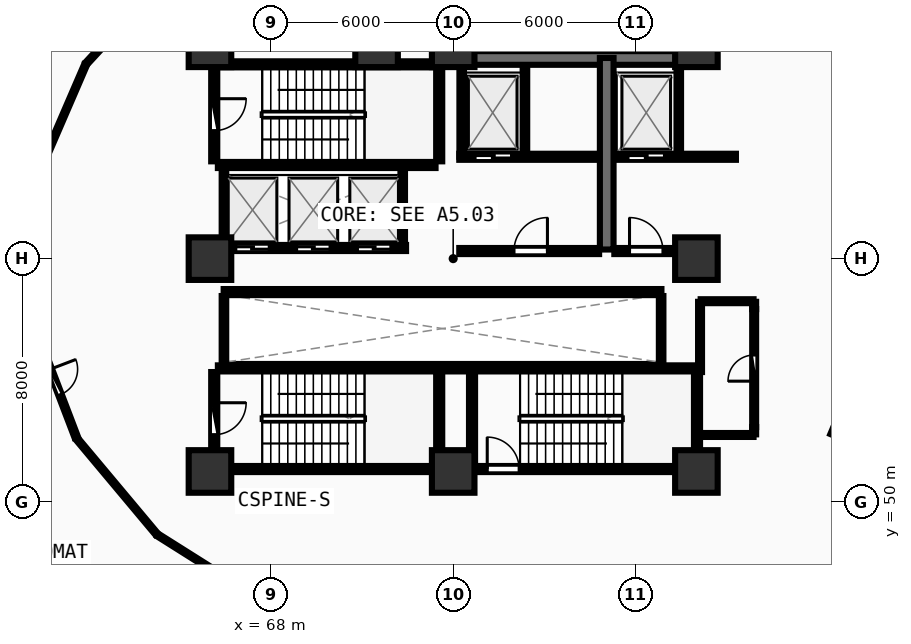
"""IFC4 building model, lengths in metres.
Left out: names, types, materials, properties, quantities, classifications, styles, units other than length and angle.
Written with IfcOpenShell. Run it as: python <this file> out.ifc"""

import sys

from ifc_helpers import new_model, si_unit, direction, frame, frame_2d, origin, origin_2d, place, context, subcontext, project, spatial, rectangle, extrude, element, fill, save


model = new_model("IFC4")
c1 = context("Model", 3, precision=1e-05, world=origin(), true_north=direction((0.0, 1.0)))
c2 = subcontext(c1, "Body", "Model", "MODEL_VIEW")
j1 = project(units=[si_unit("LENGTHUNIT", "METRE"), si_unit("PLANEANGLEUNIT", "RADIAN")], contexts=[c1])
p1 = place(None, origin())
s1 = spatial("IfcSite", under=j1, at=p1, CompositionType="ELEMENT")
p2 = place(p1, origin())
s2 = spatial("IfcBuilding", under=s1, at=p2, CompositionType="ELEMENT")
p3 = place(p2, frame((0.0, 0.0, 13.5)))
s3 = spatial("IfcBuildingStorey", under=s2, at=p3, CompositionType="ELEMENT", Elevation=13.5)
for number, where, z_axis, x_axis in (
    (1, (66.0, 51.0, 0.0), (0.0, 0.0, 1.0), (1.0, 0.0, 0.0)),
    (2, (74.0, 51.0, 0.0), (0.0, 0.0, 1.0), (1.0, 0.0, 0.0)),
    (3, (82.0, 51.0, 0.0), (0.0, 0.0, 1.0), (1.0, 0.0, 0.0)),
    (4, (82.0, 58.0, 0.0), (0.0, 0.0, 1.0), (1.0, 0.0, 0.0)),
    (5, (82.0, 65.0, 0.0), (0.0, 0.0, 1.0), (1.0, 0.0, 0.0)),
    (6, (74.0, 65.0, 0.0), (0.0, 0.0, 1.0), (1.0, 0.0, 0.0)),
    (7, (71.48, 65.0, 0.0), (0.0, 0.0, 1.0), (1.0, 0.0, 0.0)),
    (8, (66.0, 65.0, 0.0), (0.0, 0.0, 1.0), (1.0, 0.0, 0.0)),
    (9, (66.0, 58.0, 0.0), (0.0, 0.0, 1.0), (1.0, 0.0, 0.0)),
):
    element("IfcColumn", number, at=place(p3, frame(where, z_axis=z_axis, x_axis=x_axis)), inside=s3, PredefinedType="PILASTER", context=c2, shape_type="SweptSolid", body=[
        extrude(rectangle(XDim=1.4, YDim=1.4, at=origin_2d()), origin(), (0.0, 0.0, 1.0), 4.5),
    ])
p4 = place(p3, frame((66.26, 61.08, 0.0), z_axis=(0.0, 0.0, 1.0), x_axis=(1.0, 0.0, 0.0)))
e10 = element("IfcWall", 10, at=p4, inside=s3, PredefinedType="SHEAR", context=c2, shape_type="SweptSolid", body=[
    extrude(rectangle(XDim=7.16, YDim=0.2, at=frame_2d((3.58, 0.0))), origin(), (0.0, 0.0, 1.0), 4.1),
])
p5 = place(p3, frame((73.54, 61.2, 0.0), z_axis=(0.0, 0.0, 1.0), x_axis=(0.0, 1.0, 0.0)))
e11 = element("IfcWall", 11, at=p5, inside=s3, PredefinedType="SHEAR", context=c2, shape_type="SweptSolid", body=[
    extrude(rectangle(XDim=3.07, YDim=0.2, at=frame_2d((1.535, 0.0))), origin(), (0.0, 0.0, 1.0), 4.1),
])
p6 = place(p3, frame((73.42, 64.39, 0.0), z_axis=(0.0, 0.0, 1.0), x_axis=(-1.0, 0.0, 0.0)))
e12 = element("IfcWall", 12, at=p6, inside=s3, PredefinedType="SHEAR", context=c2, shape_type="SweptSolid", body=[
    extrude(rectangle(XDim=7.16, YDim=0.2, at=frame_2d((3.58, 0.0))), origin(), (0.0, 0.0, 1.0), 4.1),
])
p7 = place(p3, frame((66.14, 64.27, 0.0), z_axis=(0.0, 0.0, 1.0), x_axis=(0.0, -1.0, 0.0)))
e13 = element("IfcWall", 13, at=p7, inside=s3, PredefinedType="SHEAR", context=c2, shape_type="SweptSolid", body=[
    extrude(rectangle(XDim=3.07, YDim=0.2, at=frame_2d((1.535, 0.0))), origin(), (0.0, 0.0, 1.0), 4.1),
])
p8 = place(p7, frame((1.01, 0.0, 0.0)))
e14 = element("IfcOpeningElement", 14, at=p8, cuts=e13, PredefinedType="OPENING", context=c2, shape_type="SweptSolid", body=[
    extrude(rectangle(XDim=1.05, YDim=2.1, at=frame_2d((0.525, 1.05))), frame((0.0, 0.11, 0.0), z_axis=(0.0, -1.0, 0.0), x_axis=(1.0, 0.0, 0.0)), (0.0, 0.0, 1.0), 0.22),
])
p9 = place(p3, frame((74.0, 51.08, 0.0), z_axis=(0.0, 0.0, 1.0), x_axis=(1.0, 0.0, 0.0)))
e15 = element("IfcWall", 15, at=p9, inside=s3, PredefinedType="SHEAR", context=c2, shape_type="SweptSolid", body=[
    extrude(rectangle(XDim=7.9, YDim=0.2, at=frame_2d((3.95, 0.0))), origin(), (0.0, 0.0, 1.0), 4.1),
])
p10 = place(p9, frame((1.12, 0.0, 0.0)))
e16 = element("IfcOpeningElement", 16, at=p10, cuts=e15, PredefinedType="OPENING", context=c2, shape_type="SweptSolid", body=[
    extrude(rectangle(XDim=1.05, YDim=2.1, at=frame_2d((0.525, 1.05))), frame((0.0, 0.11, 0.0), z_axis=(0.0, -1.0, 0.0), x_axis=(1.0, 0.0, 0.0)), (0.0, 0.0, 1.0), 0.22),
])
p11 = place(p3, frame((82.02, 51.2, 0.0), z_axis=(0.0, 0.0, 1.0), x_axis=(0.0, 1.0, 0.0)))
e17 = element("IfcWall", 17, at=p11, inside=s3, PredefinedType="SHEAR", context=c2, shape_type="SweptSolid", body=[
    extrude(rectangle(XDim=3.07, YDim=0.2, at=frame_2d((1.535, 0.0))), origin(), (0.0, 0.0, 1.0), 4.1),
])
p12 = place(p3, frame((81.9, 54.39, 0.0), z_axis=(0.0, 0.0, 1.0), x_axis=(-1.0, 0.0, 0.0)))
e18 = element("IfcWall", 18, at=p12, inside=s3, PredefinedType="SHEAR", context=c2, shape_type="SweptSolid", body=[
    extrude(rectangle(XDim=8.46, YDim=0.2, at=frame_2d((4.23, 0.0))), origin(), (0.0, 0.0, 1.0), 4.1),
])
p13 = place(p3, frame((74.62, 54.27, 0.0), z_axis=(0.0, 0.0, 1.0), x_axis=(0.0, -1.0, 0.0)))
e19 = element("IfcWall", 19, at=p13, inside=s3, PredefinedType="SHEAR", context=c2, shape_type="SweptSolid", body=[
    extrude(rectangle(XDim=3.07, YDim=0.2, at=frame_2d((1.535, 0.0))), origin(), (0.0, 0.0, 1.0), 4.1),
])
p14 = place(p3, frame((66.26, 51.08, 0.0), z_axis=(0.0, 0.0, 1.0), x_axis=(1.0, 0.0, 0.0)))
e20 = element("IfcWall", 20, at=p14, inside=s3, PredefinedType="SHEAR", context=c2, shape_type="SweptSolid", body=[
    extrude(rectangle(XDim=7.16, YDim=0.2, at=frame_2d((3.58, 0.0))), origin(), (0.0, 0.0, 1.0), 4.1),
])
p15 = place(p3, frame((73.54, 51.2, 0.0), z_axis=(0.0, 0.0, 1.0), x_axis=(0.0, 1.0, 0.0)))
e21 = element("IfcWall", 21, at=p15, inside=s3, PredefinedType="SHEAR", context=c2, shape_type="SweptSolid", body=[
    extrude(rectangle(XDim=3.07, YDim=0.2, at=frame_2d((1.535, 0.0))), origin(), (0.0, 0.0, 1.0), 4.1),
])
p16 = place(p3, frame((73.42, 54.39, 0.0), z_axis=(0.0, 0.0, 1.0), x_axis=(-1.0, 0.0, 0.0)))
e22 = element("IfcWall", 22, at=p16, inside=s3, PredefinedType="SHEAR", context=c2, shape_type="SweptSolid", body=[
    extrude(rectangle(XDim=7.16, YDim=0.2, at=frame_2d((3.58, 0.0))), origin(), (0.0, 0.0, 1.0), 4.1),
])
p17 = place(p3, frame((66.14, 54.27, 0.0), z_axis=(0.0, 0.0, 1.0), x_axis=(0.0, -1.0, 0.0)))
e23 = element("IfcWall", 23, at=p17, inside=s3, PredefinedType="SHEAR", context=c2, shape_type="SweptSolid", body=[
    extrude(rectangle(XDim=3.07, YDim=0.2, at=frame_2d((1.535, 0.0))), origin(), (0.0, 0.0, 1.0), 4.1),
])
p18 = place(p17, frame((1.01, 0.0, 0.0)))
e24 = element("IfcOpeningElement", 24, at=p18, cuts=e23, PredefinedType="OPENING", context=c2, shape_type="SweptSolid", body=[
    extrude(rectangle(XDim=1.05, YDim=2.1, at=frame_2d((0.525, 1.05))), frame((0.0, 0.11, 0.0), z_axis=(0.0, -1.0, 0.0), x_axis=(1.0, 0.0, 0.0)), (0.0, 0.0, 1.0), 0.22),
])
p19 = place(p3, frame((74.0, 64.6, 0.0), z_axis=(0.0, 0.0, 1.0), x_axis=(1.0, 0.0, 0.0)))
e25 = element("IfcWall", 25, at=p19, inside=s3, PredefinedType="SHEAR", context=c2, shape_type="SweptSolid", body=[
    extrude(rectangle(XDim=8.0, YDim=0.45, at=frame_2d((4.0, 0.0))), origin(), (0.0, 0.0, 1.0), 4.1),
])
p20 = place(p3, frame((79.05, 58.3, 0.0), z_axis=(0.0, 0.0, 1.0), x_axis=(0.0, 1.0, 0.0)))
e26 = element("IfcWall", 26, at=p20, inside=s3, PredefinedType="SHEAR", context=c2, shape_type="SweptSolid", body=[
    extrude(rectangle(XDim=6.3, YDim=0.45, at=frame_2d((3.15, 0.0))), origin(), (0.0, 0.0, 1.0), 4.1),
])
p21 = place(p3, frame((74.2, 61.35, 0.0), z_axis=(0.0, 0.0, 1.0), x_axis=(1.0, 0.0, 0.0)))
e27 = element("IfcWall", 27, at=p21, inside=s3, PredefinedType="SOLIDWALL", context=c2, shape_type="SweptSolid", body=[
    extrude(rectangle(XDim=4.6, YDim=0.2, at=frame_2d((2.3, 0.0))), origin(), (0.0, 0.0, 1.0), 4.09),
])
p22 = place(p21, frame((0.52, 0.0, 0.0)))
e28 = element("IfcOpeningElement", 28, at=p22, cuts=e27, PredefinedType="OPENING", context=c2, shape_type="SweptSolid", body=[
    extrude(rectangle(XDim=1.2, YDim=2.15, at=frame_2d((0.6, 1.075))), frame((0.0, 0.11, 0.0), z_axis=(0.0, -1.0, 0.0), x_axis=(1.0, 0.0, 0.0)), (0.0, 0.0, 1.0), 0.22),
])
p23 = place(p3, frame((74.28, 61.35, 0.0), z_axis=(0.0, 0.0, 1.0), x_axis=(0.0, 1.0, 0.0)))
e29 = element("IfcWall", 29, at=p23, inside=s3, PredefinedType="PARTITIONING", context=c2, shape_type="SweptSolid", body=[
    extrude(rectangle(XDim=2.97, YDim=0.15, at=frame_2d((1.485, 0.0))), origin(), (0.0, 0.0, 1.0), 4.09),
])
p24 = place(p3, frame((76.36, 61.48, 0.0), z_axis=(0.0, 0.0, 1.0), x_axis=(0.0, 1.0, 0.0)))
e30 = element("IfcWall", 30, at=p24, inside=s3, PredefinedType="PARTITIONING", context=c2, shape_type="SweptSolid", body=[
    extrude(rectangle(XDim=2.84, YDim=0.15, at=frame_2d((1.42, 0.0))), origin(), (0.0, 0.0, 1.0), 4.09),
])
p25 = place(p3, frame((79.3, 61.35, 0.0), z_axis=(0.0, 0.0, 1.0), x_axis=(1.0, 0.0, 0.0)))
e31 = element("IfcWall", 31, at=p25, inside=s3, PredefinedType="SOLIDWALL", context=c2, shape_type="SweptSolid", body=[
    extrude(rectangle(XDim=4.0, YDim=0.2, at=frame_2d((2.0, 0.0))), origin(), (0.0, 0.0, 1.0), 3.385),
])
p26 = place(p25, frame((0.45, 0.0, 0.0)))
e32 = element("IfcOpeningElement", 32, at=p26, cuts=e31, PredefinedType="OPENING", context=c2, shape_type="SweptSolid", body=[
    extrude(rectangle(XDim=1.2, YDim=2.15, at=frame_2d((0.6, 1.075))), frame((0.0, 0.11, 0.0), z_axis=(0.0, -1.0, 0.0), x_axis=(1.0, 0.0, 0.0)), (0.0, 0.0, 1.0), 0.22),
])
p27 = place(p3, frame((81.42, 61.48, 0.0), z_axis=(0.0, 0.0, 1.0), x_axis=(0.0, 1.0, 0.0)))
e33 = element("IfcWall", 33, at=p27, inside=s3, PredefinedType="PARTITIONING", context=c2, shape_type="SweptSolid", body=[
    extrude(rectangle(XDim=2.84, YDim=0.15, at=frame_2d((1.42, 0.0))), origin(), (0.0, 0.0, 1.0), 4.09),
])
p28 = place(p3, frame((74.2, 58.25, 0.0), z_axis=(0.0, 0.0, 1.0), x_axis=(1.0, 0.0, 0.0)))
e34 = element("IfcWall", 34, at=p28, inside=s3, PredefinedType="SOLIDWALL", context=c2, shape_type="SweptSolid", body=[
    extrude(rectangle(XDim=4.6, YDim=0.2, at=frame_2d((2.3, 0.0))), origin(), (0.0, 0.0, 1.0), 4.09),
])
p29 = place(p28, frame((1.8, 0.0, 0.0)))
e35 = element("IfcOpeningElement", 35, at=p29, cuts=e34, PredefinedType="OPENING", context=c2, shape_type="SweptSolid", body=[
    extrude(rectangle(XDim=1.1, YDim=2.1, at=frame_2d((0.55, 1.05))), frame((0.0, 0.11, 0.0), z_axis=(0.0, -1.0, 0.0), x_axis=(1.0, 0.0, 0.0)), (0.0, 0.0, 1.0), 0.22),
])
p30 = place(p3, frame((79.3, 58.25, 0.0), z_axis=(0.0, 0.0, 1.0), x_axis=(1.0, 0.0, 0.0)))
e36 = element("IfcWall", 36, at=p30, inside=s3, PredefinedType="SOLIDWALL", context=c2, shape_type="SweptSolid", body=[
    extrude(rectangle(XDim=1.98, YDim=0.2, at=frame_2d((0.99, 0.0))), origin(), (0.0, 0.0, 1.0), 4.09),
])
p31 = place(p30, frame((0.5, 0.0, 0.0)))
e37 = element("IfcOpeningElement", 37, at=p31, cuts=e36, PredefinedType="OPENING", context=c2, shape_type="SweptSolid", body=[
    extrude(rectangle(XDim=1.1, YDim=2.1, at=frame_2d((0.55, 1.05))), frame((0.0, 0.11, 0.0), z_axis=(0.0, -1.0, 0.0), x_axis=(1.0, 0.0, 0.0)), (0.0, 0.0, 1.0), 0.22),
])
p32 = place(p3, frame((66.45, 58.35, 0.0), z_axis=(0.0, 0.0, 1.0), x_axis=(1.0, 0.0, 0.0)))
e38 = element("IfcWall", 38, at=p32, inside=s3, PredefinedType="SOLIDWALL", context=c2, shape_type="SweptSolid", body=[
    extrude(rectangle(XDim=6.0, YDim=0.2, at=frame_2d((3.0, 0.0))), origin(), (0.0, 0.0, 1.0), 4.09),
])
p33 = place(p32, frame((0.4, 0.0, 0.0)))
e39 = element("IfcOpeningElement", 39, at=p33, cuts=e38, PredefinedType="OPENING", context=c2, shape_type="SweptSolid", body=[
    extrude(rectangle(XDim=1.1, YDim=2.1, at=frame_2d((0.55, 1.05))), frame((0.0, 0.11, 0.0), z_axis=(0.0, -1.0, 0.0), x_axis=(1.0, 0.0, 0.0)), (0.0, 0.0, 1.0), 0.22),
])
p34 = place(p32, frame((2.4, 0.0, 0.0)))
e40 = element("IfcOpeningElement", 40, at=p34, cuts=e38, PredefinedType="OPENING", context=c2, shape_type="SweptSolid", body=[
    extrude(rectangle(XDim=1.1, YDim=2.1, at=frame_2d((0.55, 1.05))), frame((0.0, 0.11, 0.0), z_axis=(0.0, -1.0, 0.0), x_axis=(1.0, 0.0, 0.0)), (0.0, 0.0, 1.0), 0.22),
])
p35 = place(p32, frame((4.4, 0.0, 0.0)))
e41 = element("IfcOpeningElement", 41, at=p35, cuts=e38, PredefinedType="OPENING", context=c2, shape_type="SweptSolid", body=[
    extrude(rectangle(XDim=1.1, YDim=2.1, at=frame_2d((0.55, 1.05))), frame((0.0, 0.11, 0.0), z_axis=(0.0, -1.0, 0.0), x_axis=(1.0, 0.0, 0.0)), (0.0, 0.0, 1.0), 0.22),
])
for number, where, z_axis, x_axis in (
    (42, (66.46, 58.48, 0.0), (0.0, 0.0, 1.0), (0.0, 1.0, 0.0)),
    (43, (72.34, 58.48, 0.0), (0.0, 0.0, 1.0), (0.0, 1.0, 0.0)),
):
    element("IfcWall", number, at=place(p3, frame(where, z_axis=z_axis, x_axis=x_axis)), inside=s3, PredefinedType="PARTITIONING", context=c2, shape_type="SweptSolid", body=[
        extrude(rectangle(XDim=2.46, YDim=0.15, at=frame_2d((1.23, 0.0))), origin(), (0.0, 0.0, 1.0), 4.09),
    ])
p36 = place(p3, frame((66.45, 56.9, 0.0), z_axis=(0.0, 0.0, 1.0), x_axis=(1.0, 0.0, 0.0)))
e44 = element("IfcWall", 44, at=p36, inside=s3, PredefinedType="SOLIDWALL", context=c2, shape_type="SweptSolid", body=[
    extrude(rectangle(XDim=14.4, YDim=0.2, at=frame_2d((7.2, 0.0))), origin(), (0.0, 0.0, 1.0), 4.09),
])
for number, where, z_axis, x_axis in (
    (45, (66.46, 54.48, 0.0), (0.0, 0.0, 1.0), (0.0, 1.0, 0.0)),
    (46, (80.84, 54.48, 0.0), (0.0, 0.0, 1.0), (0.0, 1.0, 0.0)),
):
    element("IfcWall", number, at=place(p3, frame(where, z_axis=z_axis, x_axis=x_axis)), inside=s3, PredefinedType="PARTITIONING", context=c2, shape_type="SweptSolid", body=[
        extrude(rectangle(XDim=2.29, YDim=0.15, at=frame_2d((1.145, 0.0))), origin(), (0.0, 0.0, 1.0), 4.09),
    ])
p37 = place(p3, frame((83.9, 52.46, 0.0), z_axis=(0.0, 0.0, 1.0), x_axis=(0.0, 1.0, 0.0)))
e47 = element("IfcWall", 47, at=p37, inside=s3, PredefinedType="PLUMBINGWALL", context=c2, shape_type="SweptSolid", body=[
    extrude(rectangle(XDim=3.88, YDim=0.13, at=frame_2d((1.94, 0.0))), origin(), (0.0, 0.0, 1.0), 4.09),
])
p38 = place(p37, frame((1.51, 0.0, 0.0)))
e48 = element("IfcOpeningElement", 48, at=p38, cuts=e47, PredefinedType="OPENING", context=c2, shape_type="SweptSolid", body=[
    extrude(rectangle(XDim=0.86, YDim=2.05, at=frame_2d((0.43, 1.025))), frame((0.0, 0.075, 0.0), z_axis=(0.0, -1.0, 0.0), x_axis=(1.0, 0.0, 0.0)), (0.0, 0.0, 1.0), 0.15),
])
p39 = place(p3, frame((60.214, 55.753, 0.0), z_axis=(0.0, 0.0, 1.0), x_axis=(0.357236014767, -0.934014148583, 0.0)))
e49 = element("IfcWall", 49, at=p39, inside=s3, PredefinedType="PARTITIONING", context=c2, shape_type="SweptSolid", body=[
    extrude(rectangle(XDim=3.878, YDim=0.12, at=frame_2d((1.939, 0.0))), origin(), (0.0, 0.0, 1.0), 4.09),
])
p40 = place(p39, frame((1.489, 0.0, 0.0)))
e50 = element("IfcOpeningElement", 50, at=p40, cuts=e49, PredefinedType="OPENING", context=c2, shape_type="SweptSolid", body=[
    extrude(rectangle(XDim=0.9, YDim=2.08, at=frame_2d((0.45, 1.04))), frame((0.0, 0.07, 0.0), z_axis=(0.0, -1.0, 0.0), x_axis=(1.0, 0.0, 0.0)), (0.0, 0.0, 1.0), 0.14),
])
p41 = place(p3, frame((82.14, 52.2, 0.0), z_axis=(0.0, 0.0, 1.0), x_axis=(1.0, 0.0, 0.0)))
e51 = element("IfcWall", 51, at=p41, inside=s3, PredefinedType="PLUMBINGWALL", context=c2, shape_type="SweptSolid", body=[
    extrude(rectangle(XDim=1.74, YDim=0.13, at=frame_2d((0.87, 0.0))), origin(), (0.0, 0.0, 1.0), 3.385),
])
for number, where, z_axis, x_axis in (
    (52, (83.9, 52.22, 0.0), (0.0, 0.0, 1.0), (0.0, 1.0, 0.0)),
    (53, (83.9, 56.34, 0.0), (0.0, 0.0, 1.0), (0.0, 1.0, 0.0)),
):
    element("IfcWall", number, at=place(p3, frame(where, z_axis=z_axis, x_axis=x_axis)), inside=s3, PredefinedType="PLUMBINGWALL", context=c2, shape_type="SweptSolid", body=[
        extrude(rectangle(XDim=0.24, YDim=0.13, at=frame_2d((0.12, 0.0))), origin(), (0.0, 0.0, 1.0), 4.09),
    ])
p42 = place(p3, frame((83.88, 56.6, 0.0), z_axis=(0.0, 0.0, 1.0), x_axis=(-1.0, 0.0, 0.0)))
e54 = element("IfcWall", 54, at=p42, inside=s3, PredefinedType="PLUMBINGWALL", context=c2, shape_type="SweptSolid", body=[
    extrude(rectangle(XDim=1.74, YDim=0.13, at=frame_2d((0.87, 0.0))), origin(), (0.0, 0.0, 1.0), 3.385),
])
p43 = place(p3, frame((82.12, 56.58, 0.0), z_axis=(0.0, 0.0, 1.0), x_axis=(0.0, -1.0, 0.0)))
e55 = element("IfcWall", 55, at=p43, inside=s3, PredefinedType="PLUMBINGWALL", context=c2, shape_type="SweptSolid", body=[
    extrude(rectangle(XDim=2.31, YDim=0.13, at=frame_2d((1.155, 0.0))), origin(), (0.0, 0.0, 1.0), 3.385),
])
p44 = place(p3, frame((64.775, 67.495, 0.0), z_axis=(0.0, 0.0, 1.0), x_axis=(-0.678666938136, -0.734446177116, 0.0)))
e56 = element("IfcWall", 56, at=p44, inside=s3, PredefinedType="PARTITIONING", context=c2, shape_type="SweptSolid", body=[
    extrude(rectangle(XDim=4.167, YDim=0.1, at=frame_2d((2.083, 0.0))), origin(), (0.0, 0.0, 1.0), 3.485),
])
p45 = place(p3, frame((61.904, 64.368, 0.0), z_axis=(0.0, 0.0, 1.0), x_axis=(-0.396638629538, -0.917974834927, 0.0)))
e57 = element("IfcWall", 57, at=p45, inside=s3, PredefinedType="PARTITIONING", context=c2, shape_type="SweptSolid", body=[
    extrude(rectangle(XDim=4.039, YDim=0.1, at=frame_2d((2.02, 0.0))), origin(), (0.0, 0.0, 1.0), 4.09),
])
p46 = place(p3, frame((61.647, 52.044, 0.0), z_axis=(0.0, 0.0, 1.0), x_axis=(0.641987153188, -0.766715393834, 0.0)))
e58 = element("IfcWall", 58, at=p46, inside=s3, PredefinedType="PARTITIONING", context=c2, shape_type="SweptSolid", body=[
    extrude(rectangle(XDim=4.032, YDim=0.1, at=frame_2d((2.016, 0.0))), origin(), (0.0, 0.0, 1.0), 3.485),
])
p47 = place(p3, frame((64.295, 48.901, 0.0), z_axis=(0.0, 0.0, 1.0), x_axis=(0.845938242176, -0.533280873859, 0.0)))
e59 = element("IfcWall", 59, at=p47, inside=s3, PredefinedType="PARTITIONING", context=c2, shape_type="SweptSolid", body=[
    extrude(rectangle(XDim=4.167, YDim=0.1, at=frame_2d((2.084, 0.0))), origin(), (0.0, 0.0, 1.0), 3.485),
])
p48 = place(p3, frame((86.451, 52.21, 0.0), z_axis=(0.0, 0.0, 1.0), x_axis=(0.388068176064, 0.921630669372, 0.0)))
e60 = element("IfcWall", 60, at=p48, inside=s3, PredefinedType="PARTITIONING", context=c2, shape_type="SweptSolid", body=[
    extrude(rectangle(XDim=2.93, YDim=0.1, at=frame_2d((1.465, 0.0))), origin(), (0.0, 0.0, 1.0), 4.09),
])
p49 = place(p8, origin())
e61 = element("IfcDoor", 61, at=p49, inside=s3, OperationType="SINGLE_SWING_LEFT", PredefinedType="DOOR", context=c2, shape_type="SweptSolid", body=[
    extrude(rectangle(XDim=1.05, YDim=2.1, at=frame_2d((0.525, 1.05))), frame((0.0, 0.025, 0.0), z_axis=(0.0, -1.0, 0.0), x_axis=(1.0, 0.0, 0.0)), (0.0, 0.0, 1.0), 0.05),
])
fill(e14, e61)
p50 = place(p10, origin())
e62 = element("IfcDoor", 62, at=p50, inside=s3, OperationType="SINGLE_SWING_LEFT", PredefinedType="DOOR", context=c2, shape_type="SweptSolid", body=[
    extrude(rectangle(XDim=1.05, YDim=2.1, at=frame_2d((0.525, 1.05))), frame((0.0, 0.025, 0.0), z_axis=(0.0, -1.0, 0.0), x_axis=(1.0, 0.0, 0.0)), (0.0, 0.0, 1.0), 0.05),
])
fill(e16, e62)
p51 = place(p18, origin())
e63 = element("IfcDoor", 63, at=p51, inside=s3, OperationType="SINGLE_SWING_LEFT", PredefinedType="DOOR", context=c2, shape_type="SweptSolid", body=[
    extrude(rectangle(XDim=1.05, YDim=2.1, at=frame_2d((0.525, 1.05))), frame((0.0, 0.025, 0.0), z_axis=(0.0, -1.0, 0.0), x_axis=(1.0, 0.0, 0.0)), (0.0, 0.0, 1.0), 0.05),
])
fill(e24, e63)
p52 = place(p22, origin())
e64 = element("IfcDoor", 64, at=p52, inside=s3, OperationType="DOUBLE_DOOR_SLIDING", PredefinedType="DOOR", context=c2, shape_type="SweptSolid", body=[
    extrude(rectangle(XDim=1.2, YDim=2.15, at=frame_2d((0.6, 1.075))), frame((0.0, 0.025, 0.0), z_axis=(0.0, -1.0, 0.0), x_axis=(1.0, 0.0, 0.0)), (0.0, 0.0, 1.0), 0.05),
])
fill(e28, e64)
p53 = place(p26, origin())
e65 = element("IfcDoor", 65, at=p53, inside=s3, OperationType="DOUBLE_DOOR_SLIDING", PredefinedType="DOOR", context=c2, shape_type="SweptSolid", body=[
    extrude(rectangle(XDim=1.2, YDim=2.15, at=frame_2d((0.6, 1.075))), frame((0.0, 0.025, 0.0), z_axis=(0.0, -1.0, 0.0), x_axis=(1.0, 0.0, 0.0)), (0.0, 0.0, 1.0), 0.05),
])
fill(e32, e65)
p54 = place(p29, frame((1.1, 0.0, 0.0), z_axis=(0.0, 0.0, 1.0), x_axis=(-1.0, 0.0, 0.0)))
e66 = element("IfcDoor", 66, at=p54, inside=s3, OperationType="SINGLE_SWING_LEFT", PredefinedType="DOOR", context=c2, shape_type="SweptSolid", body=[
    extrude(rectangle(XDim=1.1, YDim=2.1, at=frame_2d((0.55, 1.05))), frame((0.0, 0.025, 0.0), z_axis=(0.0, -1.0, 0.0), x_axis=(1.0, 0.0, 0.0)), (0.0, 0.0, 1.0), 0.05),
])
fill(e35, e66)
p55 = place(p31, frame((1.1, 0.0, 0.0), z_axis=(0.0, 0.0, 1.0), x_axis=(-1.0, 0.0, 0.0)))
e67 = element("IfcDoor", 67, at=p55, inside=s3, OperationType="SINGLE_SWING_RIGHT", PredefinedType="DOOR", context=c2, shape_type="SweptSolid", body=[
    extrude(rectangle(XDim=1.1, YDim=2.1, at=frame_2d((0.55, 1.05))), frame((0.0, 0.025, 0.0), z_axis=(0.0, -1.0, 0.0), x_axis=(1.0, 0.0, 0.0)), (0.0, 0.0, 1.0), 0.05),
])
fill(e37, e67)
p56 = place(p33, origin())
e68 = element("IfcDoor", 68, at=p56, inside=s3, OperationType="DOUBLE_DOOR_SLIDING", PredefinedType="DOOR", context=c2, shape_type="SweptSolid", body=[
    extrude(rectangle(XDim=1.1, YDim=2.1, at=frame_2d((0.55, 1.05))), frame((0.0, 0.025, 0.0), z_axis=(0.0, -1.0, 0.0), x_axis=(1.0, 0.0, 0.0)), (0.0, 0.0, 1.0), 0.05),
])
fill(e39, e68)
p57 = place(p34, origin())
e69 = element("IfcDoor", 69, at=p57, inside=s3, OperationType="DOUBLE_DOOR_SLIDING", PredefinedType="DOOR", context=c2, shape_type="SweptSolid", body=[
    extrude(rectangle(XDim=1.1, YDim=2.1, at=frame_2d((0.55, 1.05))), frame((0.0, 0.025, 0.0), z_axis=(0.0, -1.0, 0.0), x_axis=(1.0, 0.0, 0.0)), (0.0, 0.0, 1.0), 0.05),
])
fill(e40, e69)
p58 = place(p35, origin())
e70 = element("IfcDoor", 70, at=p58, inside=s3, OperationType="DOUBLE_DOOR_SLIDING", PredefinedType="DOOR", context=c2, shape_type="SweptSolid", body=[
    extrude(rectangle(XDim=1.1, YDim=2.1, at=frame_2d((0.55, 1.05))), frame((0.0, 0.025, 0.0), z_axis=(0.0, -1.0, 0.0), x_axis=(1.0, 0.0, 0.0)), (0.0, 0.0, 1.0), 0.05),
])
fill(e41, e70)
p59 = place(p38, origin())
e71 = element("IfcDoor", 71, at=p59, inside=s3, OperationType="SINGLE_SWING_LEFT", PredefinedType="DOOR", context=c2, shape_type="SweptSolid", body=[
    extrude(rectangle(XDim=0.86, YDim=2.05, at=frame_2d((0.43, 1.025))), frame((0.0, 0.025, 0.0), z_axis=(0.0, -1.0, 0.0), x_axis=(1.0, 0.0, 0.0)), (0.0, 0.0, 1.0), 0.05),
])
fill(e48, e71)
p60 = place(p40, origin())
e72 = element("IfcDoor", 72, at=p60, inside=s3, OperationType="SINGLE_SWING_LEFT", PredefinedType="DOOR", context=c2, shape_type="SweptSolid", body=[
    extrude(rectangle(XDim=0.9, YDim=2.08, at=frame_2d((0.45, 1.04))), frame((0.0, 0.025, 0.0), z_axis=(0.0, -1.0, 0.0), x_axis=(1.0, 0.0, 0.0)), (0.0, 0.0, 1.0), 0.05),
])
fill(e50, e72)
save(model, sys.argv[1])
